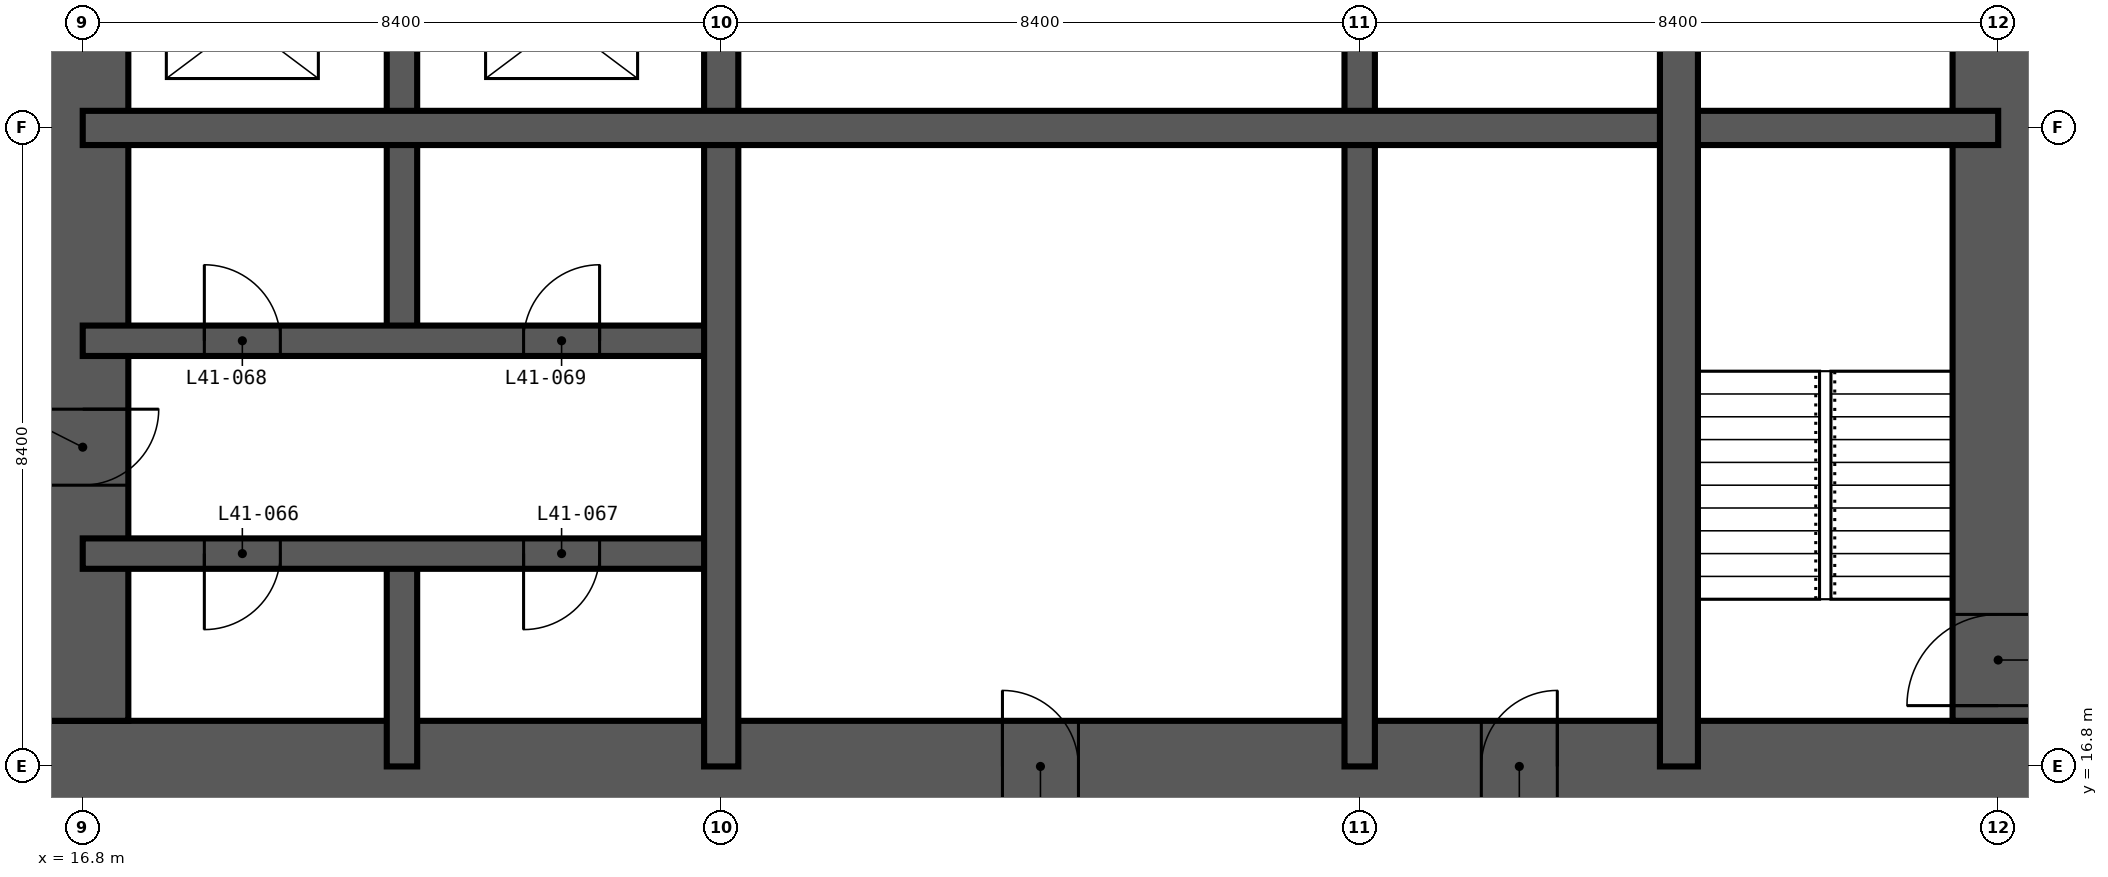
"""IFC4 building model, lengths in metres.
Left out: names, types, materials, properties, quantities, classifications, styles, units other than length and angle.
Written with IfcOpenShell. Run it as: python <this file> out.ifc"""

import sys

from ifc_helpers import new_model, si_unit, direction, frame, frame_2d, origin, place, context, subcontext, project, spatial, rectangle, extrude, element, fill, save


model = new_model("IFC4")
c1 = context("Model", 3, precision=1e-05, world=origin(), true_north=direction((0.0, 1.0)))
c2 = subcontext(c1, "Body", "Model", "MODEL_VIEW")
j1 = project(units=[si_unit("LENGTHUNIT", "METRE"), si_unit("PLANEANGLEUNIT", "RADIAN")], contexts=[c1])
p1 = place(None, origin())
s1 = spatial("IfcSite", under=j1, at=p1, CompositionType="ELEMENT")
p2 = place(p1, origin())
s2 = spatial("IfcBuilding", under=s1, at=p2, CompositionType="ELEMENT")
p3 = place(p2, frame((0.0, 0.0, 162.6)))
s3 = spatial("IfcBuildingStorey", under=s2, at=p3, CompositionType="ELEMENT", Elevation=162.6)
p4 = place(p3, frame((16.2, 16.8, -0.35), z_axis=(0.0, 0.0, 1.0), x_axis=(1.0, 0.0, 0.0)))
e1 = element("IfcWall", 1, at=p4, inside=s3, PredefinedType="SHEAR", context=c2, shape_type="SweptSolid", body=[
    extrude(rectangle(XDim=26.4, YDim=1.2, at=frame_2d((13.2, 0.0))), origin(), (0.0, 0.0, 1.0), 3.6),
])
p5 = place(p4, frame((12.7, 0.0, 0.35)))
e2 = element("IfcOpeningElement", 2, at=p5, cuts=e1, PredefinedType="OPENING", context=c2, shape_type="SweptSolid", body=[
    extrude(rectangle(XDim=1.0, YDim=2.1, at=frame_2d((0.5, 1.05))), frame((0.0, 0.61, 0.0), z_axis=(0.0, -1.0, 0.0), x_axis=(1.0, 0.0, 0.0)), (0.0, 0.0, 1.0), 1.22),
])
p6 = place(p4, frame((19.0, 0.0, 0.35)))
e3 = element("IfcOpeningElement", 3, at=p6, cuts=e1, PredefinedType="OPENING", context=c2, shape_type="SweptSolid", body=[
    extrude(rectangle(XDim=1.0, YDim=2.1, at=frame_2d((0.5, 1.05))), frame((0.0, 0.61, 0.0), z_axis=(0.0, -1.0, 0.0), x_axis=(1.0, 0.0, 0.0)), (0.0, 0.0, 1.0), 1.22),
])
p7 = place(p3, frame((42.0, 17.4, -0.35), z_axis=(0.0, 0.0, 1.0), x_axis=(0.0, 1.0, 0.0)))
e4 = element("IfcWall", 4, at=p7, inside=s3, PredefinedType="SHEAR", context=c2, shape_type="SweptSolid", body=[
    extrude(rectangle(XDim=24.0, YDim=1.2, at=frame_2d((12.0, 0.0))), origin(), (0.0, 0.0, 1.0), 3.6),
])
p8 = place(p7, frame((0.2, 0.0, 0.35)))
e5 = element("IfcOpeningElement", 5, at=p8, cuts=e4, PredefinedType="OPENING", context=c2, shape_type="SweptSolid", body=[
    extrude(rectangle(XDim=1.2, YDim=2.2, at=frame_2d((0.6, 1.1))), frame((0.0, 0.61, 0.0), z_axis=(0.0, -1.0, 0.0), x_axis=(1.0, 0.0, 0.0)), (0.0, 0.0, 1.0), 1.22),
])
p9 = place(p7, frame((11.5, 0.0, 0.35)))
e6 = element("IfcOpeningElement", 6, at=p9, cuts=e4, PredefinedType="OPENING", context=c2, shape_type="SweptSolid", body=[
    extrude(rectangle(XDim=1.0, YDim=2.1, at=frame_2d((0.5, 1.05))), frame((0.0, 0.61, 0.0), z_axis=(0.0, -1.0, 0.0), x_axis=(1.0, 0.0, 0.0)), (0.0, 0.0, 1.0), 1.22),
])
p10 = place(p7, frame((19.9, 0.0, 0.35)))
e7 = element("IfcOpeningElement", 7, at=p10, cuts=e4, PredefinedType="OPENING", context=c2, shape_type="SweptSolid", body=[
    extrude(rectangle(XDim=1.0, YDim=2.1, at=frame_2d((0.5, 1.05))), frame((0.0, 0.61, 0.0), z_axis=(0.0, -1.0, 0.0), x_axis=(1.0, 0.0, 0.0)), (0.0, 0.0, 1.0), 1.22),
])
p11 = place(p3, frame((16.8, 41.4, -0.35), z_axis=(0.0, 0.0, 1.0), x_axis=(0.0, -1.0, 0.0)))
e8 = element("IfcWall", 8, at=p11, inside=s3, PredefinedType="SHEAR", context=c2, shape_type="SweptSolid", body=[
    extrude(rectangle(XDim=24.0, YDim=1.2, at=frame_2d((12.0, 0.0))), origin(), (0.0, 0.0, 1.0), 3.6),
])
p12 = place(p11, frame((11.1, 0.0, 0.35)))
e9 = element("IfcOpeningElement", 9, at=p12, cuts=e8, PredefinedType="OPENING", context=c2, shape_type="SweptSolid", body=[
    extrude(rectangle(XDim=1.8, YDim=2.2, at=frame_2d((0.9, 1.1))), frame((0.0, 0.61, 0.0), z_axis=(0.0, -1.0, 0.0), x_axis=(1.0, 0.0, 0.0)), (0.0, 0.0, 1.0), 1.22),
])
p13 = place(p11, frame((19.9, 0.0, 0.35)))
e10 = element("IfcOpeningElement", 10, at=p13, cuts=e8, PredefinedType="OPENING", context=c2, shape_type="SweptSolid", body=[
    extrude(rectangle(XDim=1.0, YDim=2.1, at=frame_2d((0.5, 1.05))), frame((0.0, 0.61, 0.0), z_axis=(0.0, -1.0, 0.0), x_axis=(1.0, 0.0, 0.0)), (0.0, 0.0, 1.0), 1.22),
])
p14 = place(p11, frame((5.2, 0.0, 0.35)))
e11 = element("IfcOpeningElement", 11, at=p14, cuts=e8, PredefinedType="OPENING", context=c2, shape_type="SweptSolid", body=[
    extrude(rectangle(XDim=1.0, YDim=2.1, at=frame_2d((0.5, 1.05))), frame((0.0, 0.61, 0.0), z_axis=(0.0, -1.0, 0.0), x_axis=(1.0, 0.0, 0.0)), (0.0, 0.0, 1.0), 1.22),
])
p15 = place(p3, frame((21.0, 16.8, -0.35), z_axis=(0.0, 0.0, 1.0), x_axis=(0.0, 1.0, 0.0)))
e12 = element("IfcWall", 12, at=p15, inside=s3, PredefinedType="SHEAR", context=c2, shape_type="SweptSolid", body=[
    extrude(rectangle(XDim=2.8, YDim=0.4, at=frame_2d((1.4, 0.0))), origin(), (0.0, 0.0, 1.0), 3.6),
])
p16 = place(p3, frame((21.0, 22.4, -0.35), z_axis=(0.0, 0.0, 1.0), x_axis=(0.0, 1.0, 0.0)))
e13 = element("IfcWall", 13, at=p16, inside=s3, PredefinedType="SHEAR", context=c2, shape_type="SweptSolid", body=[
    extrude(rectangle(XDim=5.6, YDim=0.4, at=frame_2d((2.8, 0.0))), origin(), (0.0, 0.0, 1.0), 3.6),
])
p17 = place(p3, frame((33.6, 16.8, -0.35), z_axis=(0.0, 0.0, 1.0), x_axis=(0.0, 1.0, 0.0)))
e14 = element("IfcWall", 14, at=p17, inside=s3, PredefinedType="SHEAR", context=c2, shape_type="SweptSolid", body=[
    extrude(rectangle(XDim=25.2, YDim=0.4, at=frame_2d((12.6, 0.0))), origin(), (0.0, 0.0, 1.0), 3.6),
])
p18 = place(p17, frame((22.5, 0.0, 0.35)))
e15 = element("IfcOpeningElement", 15, at=p18, cuts=e14, PredefinedType="OPENING", context=c2, shape_type="SweptSolid", body=[
    extrude(rectangle(XDim=1.2, YDim=2.2, at=frame_2d((0.6, 1.1))), frame((0.0, 0.21, 0.0), z_axis=(0.0, -1.0, 0.0), x_axis=(1.0, 0.0, 0.0)), (0.0, 0.0, 1.0), 0.42),
])
p19 = place(p17, frame((18.3, 0.0, 0.35)))
e16 = element("IfcOpeningElement", 16, at=p19, cuts=e14, PredefinedType="OPENING", context=c2, shape_type="SweptSolid", body=[
    extrude(rectangle(XDim=1.2, YDim=2.2, at=frame_2d((0.6, 1.1))), frame((0.0, 0.21, 0.0), z_axis=(0.0, -1.0, 0.0), x_axis=(1.0, 0.0, 0.0)), (0.0, 0.0, 1.0), 0.42),
])
p20 = place(p17, frame((12.1, 0.0, 0.35)))
e17 = element("IfcOpeningElement", 17, at=p20, cuts=e14, PredefinedType="OPENING", context=c2, shape_type="SweptSolid", body=[
    extrude(rectangle(XDim=1.0, YDim=2.1, at=frame_2d((0.5, 1.05))), frame((0.0, 0.21, 0.0), z_axis=(0.0, -1.0, 0.0), x_axis=(1.0, 0.0, 0.0)), (0.0, 0.0, 1.0), 0.42),
])
p21 = place(p3, frame((16.8, 19.6, -0.35), z_axis=(0.0, 0.0, 1.0), x_axis=(1.0, 0.0, 0.0)))
e18 = element("IfcWall", 18, at=p21, inside=s3, PredefinedType="SHEAR", context=c2, shape_type="SweptSolid", body=[
    extrude(rectangle(XDim=8.4, YDim=0.4, at=frame_2d((4.2, 0.0))), origin(), (0.0, 0.0, 1.0), 3.6),
])
p22 = place(p21, frame((1.6, 0.0, 0.35)))
e19 = element("IfcOpeningElement", 19, at=p22, cuts=e18, PredefinedType="OPENING", context=c2, shape_type="SweptSolid", body=[
    extrude(rectangle(XDim=1.0, YDim=2.1, at=frame_2d((0.5, 1.05))), frame((0.0, 0.21, 0.0), z_axis=(0.0, -1.0, 0.0), x_axis=(1.0, 0.0, 0.0)), (0.0, 0.0, 1.0), 0.42),
])
p23 = place(p21, frame((5.8, 0.0, 0.35)))
e20 = element("IfcOpeningElement", 20, at=p23, cuts=e18, PredefinedType="OPENING", context=c2, shape_type="SweptSolid", body=[
    extrude(rectangle(XDim=1.0, YDim=2.1, at=frame_2d((0.5, 1.05))), frame((0.0, 0.21, 0.0), z_axis=(0.0, -1.0, 0.0), x_axis=(1.0, 0.0, 0.0)), (0.0, 0.0, 1.0), 0.42),
])
p24 = place(p3, frame((16.8, 22.4, -0.35), z_axis=(0.0, 0.0, 1.0), x_axis=(1.0, 0.0, 0.0)))
e21 = element("IfcWall", 21, at=p24, inside=s3, PredefinedType="SHEAR", context=c2, shape_type="SweptSolid", body=[
    extrude(rectangle(XDim=8.4, YDim=0.4, at=frame_2d((4.2, 0.0))), origin(), (0.0, 0.0, 1.0), 3.6),
])
p25 = place(p24, frame((1.6, 0.0, 0.35)))
e22 = element("IfcOpeningElement", 22, at=p25, cuts=e21, PredefinedType="OPENING", context=c2, shape_type="SweptSolid", body=[
    extrude(rectangle(XDim=1.0, YDim=2.1, at=frame_2d((0.5, 1.05))), frame((0.0, 0.21, 0.0), z_axis=(0.0, -1.0, 0.0), x_axis=(1.0, 0.0, 0.0)), (0.0, 0.0, 1.0), 0.42),
])
p26 = place(p24, frame((5.8, 0.0, 0.35)))
e23 = element("IfcOpeningElement", 23, at=p26, cuts=e21, PredefinedType="OPENING", context=c2, shape_type="SweptSolid", body=[
    extrude(rectangle(XDim=1.0, YDim=2.1, at=frame_2d((0.5, 1.05))), frame((0.0, 0.21, 0.0), z_axis=(0.0, -1.0, 0.0), x_axis=(1.0, 0.0, 0.0)), (0.0, 0.0, 1.0), 0.42),
])
for number, where, z_axis, x_axis in (
    (24, (25.2, 16.8, -0.35), (0.0, 0.0, 1.0), (0.0, 1.0, 0.0)),
    (25, (16.8, 25.2, -0.35), (0.0, 0.0, 1.0), (1.0, 0.0, 0.0)),
):
    element("IfcWall", number, at=place(p3, frame(where, z_axis=z_axis, x_axis=x_axis)), inside=s3, PredefinedType="SHEAR", context=c2, shape_type="SweptSolid", body=[
        extrude(rectangle(XDim=25.2, YDim=0.45, at=frame_2d((12.6, 0.0))), origin(), (0.0, 0.0, 1.0), 3.6),
    ])
p27 = place(p3, frame((37.8, 16.8, -0.35), z_axis=(0.0, 0.0, 1.0), x_axis=(0.0, 1.0, 0.0)))
e26 = element("IfcWall", 26, at=p27, inside=s3, PredefinedType="SHEAR", context=c2, shape_type="SweptSolid", body=[
    extrude(rectangle(XDim=11.2, YDim=0.5, at=frame_2d((5.6, 0.0))), origin(), (0.0, 0.0, 1.0), 3.6),
])
p28 = place(p8, origin())
e27 = element("IfcDoor", 27, at=p28, inside=s3, OperationType="SINGLE_SWING_LEFT", PredefinedType="DOOR", context=c2, shape_type="SweptSolid", body=[
    extrude(rectangle(XDim=1.2, YDim=2.2, at=frame_2d((0.6, 1.1))), frame((0.0, 0.025, 0.0), z_axis=(0.0, -1.0, 0.0), x_axis=(1.0, 0.0, 0.0)), (0.0, 0.0, 1.0), 0.05),
])
fill(e5, e27)
p29 = place(p22, frame((1.0, 0.0, 0.0), z_axis=(0.0, 0.0, 1.0), x_axis=(-1.0, 0.0, 0.0)))
e28 = element("IfcDoor", 28, at=p29, inside=s3, OperationType="SINGLE_SWING_RIGHT", PredefinedType="DOOR", context=c2, shape_type="SweptSolid", body=[
    extrude(rectangle(XDim=1.0, YDim=2.1, at=frame_2d((0.5, 1.05))), frame((0.0, 0.025, 0.0), z_axis=(0.0, -1.0, 0.0), x_axis=(1.0, 0.0, 0.0)), (0.0, 0.0, 1.0), 0.05),
])
fill(e19, e28)
p30 = place(p23, frame((1.0, 0.0, 0.0), z_axis=(0.0, 0.0, 1.0), x_axis=(-1.0, 0.0, 0.0)))
e29 = element("IfcDoor", 29, at=p30, inside=s3, OperationType="SINGLE_SWING_RIGHT", PredefinedType="DOOR", context=c2, shape_type="SweptSolid", body=[
    extrude(rectangle(XDim=1.0, YDim=2.1, at=frame_2d((0.5, 1.05))), frame((0.0, 0.025, 0.0), z_axis=(0.0, -1.0, 0.0), x_axis=(1.0, 0.0, 0.0)), (0.0, 0.0, 1.0), 0.05),
])
fill(e20, e29)
p31 = place(p25, origin())
e30 = element("IfcDoor", 30, at=p31, inside=s3, OperationType="SINGLE_SWING_LEFT", PredefinedType="DOOR", context=c2, shape_type="SweptSolid", body=[
    extrude(rectangle(XDim=1.0, YDim=2.1, at=frame_2d((0.5, 1.05))), frame((0.0, 0.025, 0.0), z_axis=(0.0, -1.0, 0.0), x_axis=(1.0, 0.0, 0.0)), (0.0, 0.0, 1.0), 0.05),
])
fill(e22, e30)
p32 = place(p26, origin())
e31 = element("IfcDoor", 31, at=p32, inside=s3, OperationType="SINGLE_SWING_RIGHT", PredefinedType="DOOR", context=c2, shape_type="SweptSolid", body=[
    extrude(rectangle(XDim=1.0, YDim=2.1, at=frame_2d((0.5, 1.05))), frame((0.0, 0.025, 0.0), z_axis=(0.0, -1.0, 0.0), x_axis=(1.0, 0.0, 0.0)), (0.0, 0.0, 1.0), 0.05),
])
fill(e23, e31)
p33 = place(p13, origin())
e32 = element("IfcDoor", 32, at=p33, inside=s3, OperationType="SINGLE_SWING_LEFT", PredefinedType="DOOR", context=c2, shape_type="SweptSolid", body=[
    extrude(rectangle(XDim=1.0, YDim=2.1, at=frame_2d((0.5, 1.05))), frame((0.0, 0.025, 0.0), z_axis=(0.0, -1.0, 0.0), x_axis=(1.0, 0.0, 0.0)), (0.0, 0.0, 1.0), 0.05),
])
fill(e10, e32)
p34 = place(p5, origin())
e33 = element("IfcDoor", 33, at=p34, inside=s3, OperationType="SINGLE_SWING_LEFT", PredefinedType="DOOR", context=c2, shape_type="SweptSolid", body=[
    extrude(rectangle(XDim=1.0, YDim=2.1, at=frame_2d((0.5, 1.05))), frame((0.0, 0.025, 0.0), z_axis=(0.0, -1.0, 0.0), x_axis=(1.0, 0.0, 0.0)), (0.0, 0.0, 1.0), 0.05),
])
fill(e2, e33)
p35 = place(p6, origin())
e34 = element("IfcDoor", 34, at=p35, inside=s3, OperationType="SINGLE_SWING_RIGHT", PredefinedType="DOOR", context=c2, shape_type="SweptSolid", body=[
    extrude(rectangle(XDim=1.0, YDim=2.1, at=frame_2d((0.5, 1.05))), frame((0.0, 0.025, 0.0), z_axis=(0.0, -1.0, 0.0), x_axis=(1.0, 0.0, 0.0)), (0.0, 0.0, 1.0), 0.05),
])
fill(e3, e34)
save(model, sys.argv[1])
